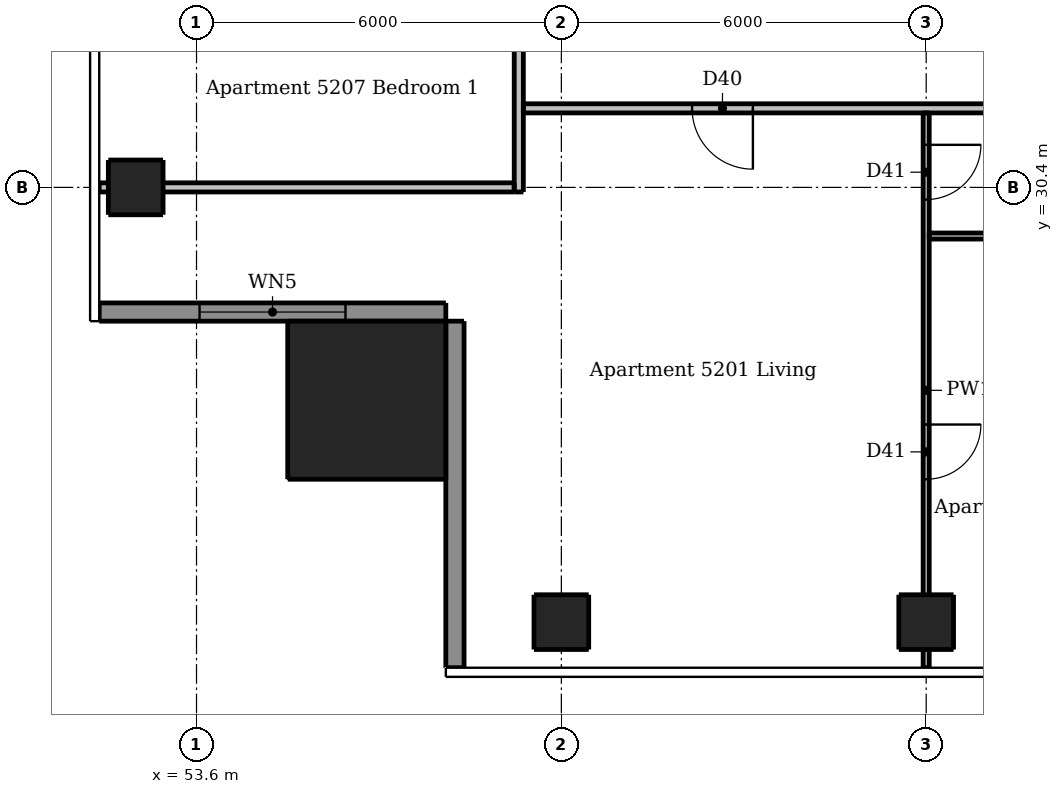
"""IFC4 building model, lengths in metres.
Left out: names, types, materials, properties, quantities, classifications, styles, units other than length and angle.
Written with IfcOpenShell. Run it as: python <this file> out.ifc"""

import sys

from ifc_helpers import new_model, si_unit, direction, frame, frame_2d, origin, origin_2d, place, context, subcontext, project, spatial, rectangle, extrude, element, fill, save


model = new_model("IFC4")
c1 = context("Model", 3, precision=1e-05, world=origin(), true_north=direction((0.0, 1.0)))
c2 = subcontext(c1, "Body", "Model", "MODEL_VIEW")
j1 = project(units=[si_unit("LENGTHUNIT", "METRE"), si_unit("PLANEANGLEUNIT", "RADIAN")], contexts=[c1])
p1 = place(None, origin())
s1 = spatial("IfcSite", under=j1, at=p1, CompositionType="ELEMENT")
p2 = place(p1, origin())
s2 = spatial("IfcBuilding", under=s1, at=p2, CompositionType="ELEMENT")
p3 = place(p2, frame((0.0, 0.0, 196.9)))
s3 = spatial("IfcBuildingStorey", under=s2, at=p3, CompositionType="ELEMENT", Elevation=196.9)
for number, where, z_axis, x_axis in (
    (1, (59.6, 23.25, 0.0), (0.0, 0.0, 1.0), (1.0, 0.0, 0.0)),
    (2, (65.6, 23.25, 0.0), (0.0, 0.0, 1.0), (1.0, 0.0, 0.0)),
    (3, (52.6, 30.4, 0.0), (0.0, 0.0, 1.0), (1.0, 0.0, 0.0)),
):
    element("IfcColumn", number, at=place(p3, frame(where, z_axis=z_axis, x_axis=x_axis)), inside=s3, PredefinedType="COLUMN", context=c2, shape_type="SweptSolid", body=[
        extrude(rectangle(XDim=0.9, YDim=0.9, at=origin_2d()), origin(), (0.0, 0.0, 1.0), 3.05),
    ])
p4 = place(p3, frame((56.4, 26.9, 0.0), z_axis=(0.0, 0.0, 1.0), x_axis=(1.0, 0.0, 0.0)))
e4 = element("IfcColumn", 4, at=p4, inside=s3, PredefinedType="COLUMN", context=c2, shape_type="SweptSolid", body=[
    extrude(rectangle(XDim=2.6, YDim=2.6, at=origin_2d()), origin(), (0.0, 0.0, 1.0), 3.3),
])
p5 = place(p3, frame((52.0, 28.35, 0.0), z_axis=(0.0, 0.0, 1.0), x_axis=(1.0, 0.0, 0.0)))
e5 = element("IfcWall", 5, at=p5, inside=s3, PredefinedType="SOLIDWALL", context=c2, shape_type="SweptSolid", body=[
    extrude(rectangle(XDim=5.7, YDim=0.3, at=frame_2d((2.85, 0.0))), origin(), (0.0, 0.0, 1.0), 3.05),
])
p6 = place(p5, frame((1.65, 0.0, 0.15)))
e6 = element("IfcOpeningElement", 6, at=p6, cuts=e5, PredefinedType="OPENING", context=c2, shape_type="SweptSolid", body=[
    extrude(rectangle(XDim=2.4, YDim=2.1, at=frame_2d((1.2, 1.05))), frame((0.0, 0.16, 0.0), z_axis=(0.0, -1.0, 0.0), x_axis=(1.0, 0.0, 0.0)), (0.0, 0.0, 1.0), 0.32),
])
p7 = place(p3, frame((57.85, 28.2, 0.0), z_axis=(0.0, 0.0, 1.0), x_axis=(0.0, -1.0, 0.0)))
e7 = element("IfcWall", 7, at=p7, inside=s3, PredefinedType="SOLIDWALL", context=c2, shape_type="SweptSolid", body=[
    extrude(rectangle(XDim=5.7, YDim=0.3, at=frame_2d((2.85, 0.0))), origin(), (0.0, 0.0, 1.0), 3.05),
])
p8 = place(p3, frame((65.6, 31.625, 0.0), z_axis=(0.0, 0.0, 1.0), x_axis=(0.0, -1.0, 0.0)))
e8 = element("IfcWall", 8, at=p8, inside=s3, PredefinedType="PARTITIONING", context=c2, shape_type="SweptSolid", body=[
    extrude(rectangle(XDim=9.125, YDim=0.1, at=frame_2d((4.562, 0.0))), origin(), (0.0, 0.0, 1.0), 2.516),
])
p9 = place(p8, frame((0.525, 0.0, 0.0)))
e9 = element("IfcOpeningElement", 9, at=p9, cuts=e8, PredefinedType="OPENING", context=c2, shape_type="SweptSolid", body=[
    extrude(rectangle(XDim=0.9, YDim=2.1, at=frame_2d((0.45, 1.05))), frame((0.0, 0.06, 0.0), z_axis=(0.0, -1.0, 0.0), x_axis=(1.0, 0.0, 0.0)), (0.0, 0.0, 1.0), 0.12),
])
p10 = place(p8, frame((5.125, 0.0, 0.0)))
e10 = element("IfcOpeningElement", 10, at=p10, cuts=e8, PredefinedType="OPENING", context=c2, shape_type="SweptSolid", body=[
    extrude(rectangle(XDim=0.9, YDim=2.1, at=frame_2d((0.45, 1.05))), frame((0.0, 0.06, 0.0), z_axis=(0.0, -1.0, 0.0), x_axis=(1.0, 0.0, 0.0)), (0.0, 0.0, 1.0), 0.12),
])
p11 = place(p3, frame((65.65, 29.6, 0.0), z_axis=(0.0, 0.0, 1.0), x_axis=(1.0, 0.0, 0.0)))
e11 = element("IfcWall", 11, at=p11, inside=s3, PredefinedType="PARTITIONING", context=c2, shape_type="SweptSolid", body=[
    extrude(rectangle(XDim=5.875, YDim=0.1, at=frame_2d((2.938, 0.0))), origin(), (0.0, 0.0, 1.0), 3.05),
])
p12 = place(p11, frame((3.75, 0.0, 0.0)))
e12 = element("IfcOpeningElement", 12, at=p12, cuts=e11, PredefinedType="OPENING", context=c2, shape_type="SweptSolid", body=[
    extrude(rectangle(XDim=0.8, YDim=2.1, at=frame_2d((0.4, 1.05))), frame((0.0, 0.06, 0.0), z_axis=(0.0, -1.0, 0.0), x_axis=(1.0, 0.0, 0.0)), (0.0, 0.0, 1.0), 0.12),
])
p13 = place(p3, frame((58.9, 30.325, 0.0), z_axis=(0.0, 0.0, 1.0), x_axis=(0.0, 1.0, 0.0)))
e13 = element("IfcWall", 13, at=p13, inside=s3, PredefinedType="PARTITIONING", context=c2, shape_type="SweptSolid", body=[
    extrude(rectangle(XDim=30.85, YDim=0.15, at=frame_2d((15.425, 0.0))), origin(), (0.0, 0.0, 1.0), 3.05),
])
p14 = place(p13, frame((7.375, 0.0, 0.0)))
e14 = element("IfcOpeningElement", 14, at=p14, cuts=e13, PredefinedType="OPENING", context=c2, shape_type="SweptSolid", body=[
    extrude(rectangle(XDim=1.0, YDim=2.1, at=frame_2d((0.5, 1.05))), frame((0.0, 0.085, 0.0), z_axis=(0.0, -1.0, 0.0), x_axis=(1.0, 0.0, 0.0)), (0.0, 0.0, 1.0), 0.17),
])
p15 = place(p13, frame((26.925, 0.0, 0.0)))
e15 = element("IfcOpeningElement", 15, at=p15, cuts=e13, PredefinedType="OPENING", context=c2, shape_type="SweptSolid", body=[
    extrude(rectangle(XDim=1.0, YDim=2.1, at=frame_2d((0.5, 1.05))), frame((0.0, 0.085, 0.0), z_axis=(0.0, -1.0, 0.0), x_axis=(1.0, 0.0, 0.0)), (0.0, 0.0, 1.0), 0.17),
])
p16 = place(p3, frame((89.525, 31.7, 0.0), z_axis=(0.0, 0.0, 1.0), x_axis=(-1.0, 0.0, 0.0)))
e16 = element("IfcWall", 16, at=p16, inside=s3, PredefinedType="PARTITIONING", context=c2, shape_type="SweptSolid", body=[
    extrude(rectangle(XDim=30.55, YDim=0.15, at=frame_2d((15.275, 0.0))), origin(), (0.0, 0.0, 1.0), 3.05),
])
p17 = place(p16, frame((26.775, 0.0, 0.0)))
e17 = element("IfcOpeningElement", 17, at=p17, cuts=e16, PredefinedType="OPENING", context=c2, shape_type="SweptSolid", body=[
    extrude(rectangle(XDim=1.0, YDim=2.1, at=frame_2d((0.5, 1.05))), frame((0.0, 0.085, 0.0), z_axis=(0.0, -1.0, 0.0), x_axis=(1.0, 0.0, 0.0)), (0.0, 0.0, 1.0), 0.17),
])
p18 = place(p16, frame((9.075, 0.0, 0.0)))
e18 = element("IfcOpeningElement", 18, at=p18, cuts=e16, PredefinedType="OPENING", context=c2, shape_type="SweptSolid", body=[
    extrude(rectangle(XDim=1.0, YDim=2.1, at=frame_2d((0.5, 1.05))), frame((0.0, 0.085, 0.0), z_axis=(0.0, -1.0, 0.0), x_axis=(1.0, 0.0, 0.0)), (0.0, 0.0, 1.0), 0.17),
])
p19 = place(p3, frame((52.0, 30.4, 0.0), z_axis=(0.0, 0.0, 1.0), x_axis=(1.0, 0.0, 0.0)))
e19 = element("IfcWall", 19, at=p19, inside=s3, PredefinedType="PARTITIONING", context=c2, shape_type="SweptSolid", body=[
    extrude(rectangle(XDim=6.825, YDim=0.15, at=frame_2d((3.413, 0.0))), origin(), (0.0, 0.0, 1.0), 2.647),
])
p20 = place(p6, origin())
e20 = element("IfcWindow", 20, at=p20, inside=s3, PartitioningType="DOUBLE_PANEL_VERTICAL", PredefinedType="WINDOW", context=c2, shape_type="SweptSolid", body=[
    extrude(rectangle(XDim=2.4, YDim=2.1, at=frame_2d((1.2, 1.05))), frame((0.0, 0.03, 0.0), z_axis=(0.0, -1.0, 0.0), x_axis=(1.0, 0.0, 0.0)), (0.0, 0.0, 1.0), 0.06),
])
fill(e6, e20)
p21 = place(p17, origin())
e21 = element("IfcDoor", 21, at=p21, inside=s3, OperationType="SINGLE_SWING_LEFT", PredefinedType="DOOR", context=c2, shape_type="SweptSolid", body=[
    extrude(rectangle(XDim=1.0, YDim=2.1, at=frame_2d((0.5, 1.05))), frame((0.0, 0.025, 0.0), z_axis=(0.0, -1.0, 0.0), x_axis=(1.0, 0.0, 0.0)), (0.0, 0.0, 1.0), 0.05),
])
fill(e17, e21)
p22 = place(p9, origin())
e22 = element("IfcDoor", 22, at=p22, inside=s3, OperationType="SINGLE_SWING_LEFT", PredefinedType="DOOR", context=c2, shape_type="SweptSolid", body=[
    extrude(rectangle(XDim=0.9, YDim=2.1, at=frame_2d((0.45, 1.05))), frame((0.0, 0.025, 0.0), z_axis=(0.0, -1.0, 0.0), x_axis=(1.0, 0.0, 0.0)), (0.0, 0.0, 1.0), 0.05),
])
fill(e9, e22)
p23 = place(p10, origin())
e23 = element("IfcDoor", 23, at=p23, inside=s3, OperationType="SINGLE_SWING_LEFT", PredefinedType="DOOR", context=c2, shape_type="SweptSolid", body=[
    extrude(rectangle(XDim=0.9, YDim=2.1, at=frame_2d((0.45, 1.05))), frame((0.0, 0.025, 0.0), z_axis=(0.0, -1.0, 0.0), x_axis=(1.0, 0.0, 0.0)), (0.0, 0.0, 1.0), 0.05),
])
fill(e10, e23)
save(model, sys.argv[1])
